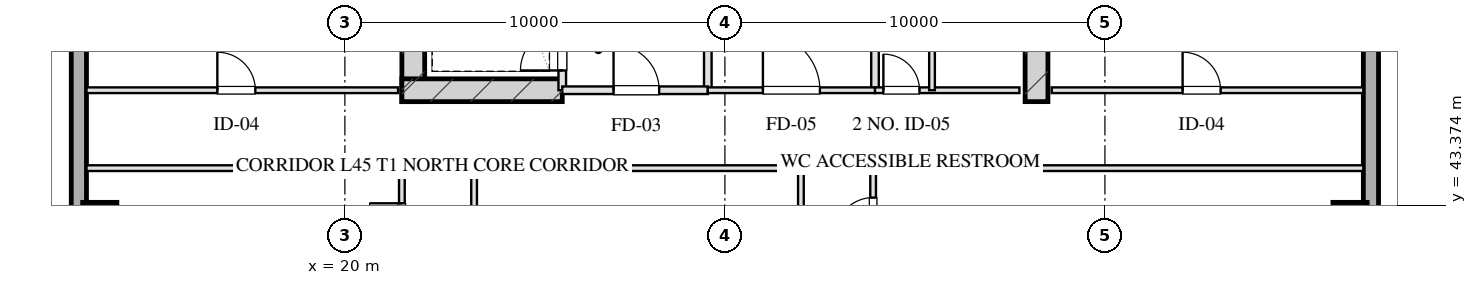
"""IFC4 building model, lengths in metres.
Left out: names, types, materials, properties, quantities, classifications, styles, units other than length and angle.
Written with IfcOpenShell. Run it as: python <this file> out.ifc"""

import sys

from ifc_helpers import new_model, si_unit, direction, frame, frame_2d, origin, origin_2d, place, context, subcontext, project, spatial, rectangle, hollow_rectangle, extrude, element, fill, save


model = new_model("IFC4")
c1 = context("Model", 3, precision=1e-05, world=origin(), true_north=direction((0.0, 1.0)))
c2 = subcontext(c1, "Body", "Model", "MODEL_VIEW")
j1 = project(units=[si_unit("LENGTHUNIT", "METRE"), si_unit("PLANEANGLEUNIT", "RADIAN")], contexts=[c1])
p1 = place(None, origin())
s1 = spatial("IfcSite", under=j1, at=p1, CompositionType="ELEMENT")
p2 = place(p1, origin())
s2 = spatial("IfcBuilding", under=s1, at=p2, CompositionType="ELEMENT")
p3 = place(p2, frame((0.0, 0.0, 170.2)))
s3 = spatial("IfcBuildingStorey", under=s2, at=p3, CompositionType="ELEMENT", Elevation=170.2)
for number, where, z_axis, x_axis in (
    (1, (21.8, 46.1, 0.0), (0.0, 0.0, 1.0), (0.0, 1.0, 0.0)),
    (2, (38.2, 46.1, 0.0), (0.0, 0.0, 1.0), (0.0, 1.0, 0.0)),
):
    element("IfcWall", number, at=place(p3, frame(where, z_axis=z_axis, x_axis=x_axis)), inside=s3, PredefinedType="SHEAR", context=c2, shape_type="SweptSolid", body=[
        extrude(rectangle(XDim=9.48, YDim=0.6, at=frame_2d((4.74, 0.0))), origin(), (0.0, 0.0, 1.0), 3.45),
    ])
p4 = place(p3, frame((21.5, 46.4, 0.0), z_axis=(0.0, 0.0, 1.0), x_axis=(1.0, 0.0, 0.0)))
e3 = element("IfcWall", 3, at=p4, inside=s3, PredefinedType="SHEAR", context=c2, shape_type="SweptSolid", body=[
    extrude(rectangle(XDim=4.22, YDim=0.6, at=frame_2d((2.11, 0.0))), origin(), (0.0, 0.0, 1.0), 3.45),
])
for number, where, z_axis, x_axis in (
    (4, (13.55, 43.0, 0.0), (0.0, 0.0, 1.0), (1.0, 0.0, 0.0)),
    (5, (46.45, 43.0, 0.0), (0.0, 0.0, 1.0), (1.0, 0.0, 0.0)),
):
    element("IfcColumn", number, at=place(p3, frame(where, z_axis=z_axis, x_axis=x_axis)), inside=s3, PredefinedType="COLUMN", context=c2, shape_type="SweptSolid", body=[
        extrude(hollow_rectangle(XDim=0.9, YDim=0.9, WallThickness=0.032, at=origin_2d()), origin(), (0.0, 0.0, 1.0), 3.451),
    ])
p5 = place(p3, frame((13.0, 10.8, 0.0), z_axis=(0.0, 0.0, 1.0), x_axis=(0.0, 1.0, 0.0)))
e6 = element("IfcWall", 6, at=p5, inside=s3, PredefinedType="SOLIDWALL", context=c2, shape_type="SweptSolid", body=[
    extrude(rectangle(XDim=46.4, YDim=0.4, at=frame_2d((23.2, 0.0))), origin(), (0.0, 0.0, 1.0), 2.61),
])
p6 = place(p3, frame((47.0, 57.2, 0.0), z_axis=(0.0, 0.0, 1.0), x_axis=(0.0, -1.0, 0.0)))
e7 = element("IfcWall", 7, at=p6, inside=s3, PredefinedType="SOLIDWALL", context=c2, shape_type="SweptSolid", body=[
    extrude(rectangle(XDim=46.4, YDim=0.4, at=frame_2d((23.2, 0.0))), origin(), (0.0, 0.0, 1.0), 2.61),
])
p7 = place(p6, frame((28.475, 0.0, 0.75)))
e8 = element("IfcOpeningElement", 8, at=p7, cuts=e7, PredefinedType="OPENING", context=c2, shape_type="SweptSolid", body=[
    extrude(rectangle(XDim=2.25, YDim=1.46, at=frame_2d((1.125, 0.73))), frame((0.0, 0.21, 0.0), z_axis=(0.0, -1.0, 0.0), x_axis=(1.0, 0.0, 0.0)), (0.0, 0.0, 1.0), 0.42),
])
p8 = place(p6, frame((24.675, 0.0, 0.75)))
e9 = element("IfcOpeningElement", 9, at=p8, cuts=e7, PredefinedType="OPENING", context=c2, shape_type="SweptSolid", body=[
    extrude(rectangle(XDim=2.25, YDim=1.46, at=frame_2d((1.125, 0.73))), frame((0.0, 0.21, 0.0), z_axis=(0.0, -1.0, 0.0), x_axis=(1.0, 0.0, 0.0)), (0.0, 0.0, 1.0), 0.42),
])
p9 = place(p3, frame((25.72, 46.4, 0.0), z_axis=(0.0, 0.0, 1.0), x_axis=(0.0, 1.0, 0.0)))
e10 = element("IfcWall", 10, at=p9, inside=s3, PredefinedType="PARTITIONING", context=c2, shape_type="SweptSolid", body=[
    extrude(rectangle(XDim=1.9, YDim=0.2, at=frame_2d((0.95, 0.0))), origin(), (0.0, 0.0, 1.0), 3.175),
])
p10 = place(p9, frame((0.52, 0.0, 0.0)))
e11 = element("IfcOpeningElement", 11, at=p10, cuts=e10, PredefinedType="OPENING", context=c2, shape_type="SweptSolid", body=[
    extrude(rectangle(XDim=1.1, YDim=2.05, at=frame_2d((0.55, 1.025))), frame((0.0, 0.11, 0.0), z_axis=(0.0, -1.0, 0.0), x_axis=(1.0, 0.0, 0.0)), (0.0, 0.0, 1.0), 0.22),
])
p11 = place(p3, frame((29.55, 46.4, 0.0), z_axis=(0.0, 0.0, 1.0), x_axis=(0.0, 1.0, 0.0)))
e12 = element("IfcWall", 12, at=p11, inside=s3, PredefinedType="PARTITIONING", context=c2, shape_type="SweptSolid", body=[
    extrude(rectangle(XDim=8.43, YDim=0.2, at=frame_2d((4.215, 0.0))), origin(), (0.0, 0.0, 1.0), 3.175),
])
p12 = place(p3, frame((25.72, 46.4, 0.0), z_axis=(0.0, 0.0, 1.0), x_axis=(1.0, 0.0, 0.0)))
e13 = element("IfcWall", 13, at=p12, inside=s3, PredefinedType="PARTITIONING", context=c2, shape_type="SweptSolid", body=[
    extrude(rectangle(XDim=3.83, YDim=0.2, at=frame_2d((1.915, 0.0))), origin(), (0.0, 0.0, 1.0), 3.175),
])
p13 = place(p12, frame((1.35, 0.0, 0.0)))
e14 = element("IfcOpeningElement", 14, at=p13, cuts=e13, PredefinedType="OPENING", context=c2, shape_type="SweptSolid", body=[
    extrude(rectangle(XDim=1.2, YDim=2.05, at=frame_2d((0.6, 1.025))), frame((0.0, 0.11, 0.0), z_axis=(0.0, -1.0, 0.0), x_axis=(1.0, 0.0, 0.0)), (0.0, 0.0, 1.0), 0.22),
])
p14 = place(p3, frame((33.95, 46.4, 0.0), z_axis=(0.0, 0.0, 1.0), x_axis=(0.0, 1.0, 0.0)))
e15 = element("IfcWall", 15, at=p14, inside=s3, PredefinedType="PARTITIONING", context=c2, shape_type="SweptSolid", body=[
    extrude(rectangle(XDim=8.43, YDim=0.2, at=frame_2d((4.215, 0.0))), origin(), (0.0, 0.0, 1.0), 3.175),
])
p15 = place(p3, frame((29.55, 46.4, 0.0), z_axis=(0.0, 0.0, 1.0), x_axis=(1.0, 0.0, 0.0)))
e16 = element("IfcWall", 16, at=p15, inside=s3, PredefinedType="PARTITIONING", context=c2, shape_type="SweptSolid", body=[
    extrude(rectangle(XDim=4.4, YDim=0.15, at=frame_2d((2.2, 0.0))), origin(), (0.0, 0.0, 1.0), 3.175),
])
p16 = place(p15, frame((1.45, 0.0, 0.0)))
e17 = element("IfcOpeningElement", 17, at=p16, cuts=e16, PredefinedType="OPENING", context=c2, shape_type="SweptSolid", body=[
    extrude(rectangle(XDim=1.5, YDim=2.05, at=frame_2d((0.75, 1.025))), frame((0.0, 0.085, 0.0), z_axis=(0.0, -1.0, 0.0), x_axis=(1.0, 0.0, 0.0)), (0.0, 0.0, 1.0), 0.17),
])
p17 = place(p3, frame((33.95, 46.4, 0.0), z_axis=(0.0, 0.0, 1.0), x_axis=(1.0, 0.0, 0.0)))
e18 = element("IfcWall", 18, at=p17, inside=s3, PredefinedType="PARTITIONING", context=c2, shape_type="SweptSolid", body=[
    extrude(rectangle(XDim=3.8, YDim=0.15, at=frame_2d((1.9, 0.0))), origin(), (0.0, 0.0, 1.0), 3.175),
])
p18 = place(p17, frame((0.22, 0.0, 0.0)))
e19 = element("IfcOpeningElement", 19, at=p18, cuts=e18, PredefinedType="OPENING", context=c2, shape_type="SweptSolid", body=[
    extrude(rectangle(XDim=0.95, YDim=2.05, at=frame_2d((0.475, 1.025))), frame((0.0, 0.085, 0.0), z_axis=(0.0, -1.0, 0.0), x_axis=(1.0, 0.0, 0.0)), (0.0, 0.0, 1.0), 0.17),
])
p19 = place(p3, frame((35.45, 46.4, 0.0), z_axis=(0.0, 0.0, 1.0), x_axis=(0.0, 1.0, 0.0)))
e20 = element("IfcWall", 20, at=p19, inside=s3, PredefinedType="PARTITIONING", context=c2, shape_type="SweptSolid", body=[
    extrude(rectangle(XDim=8.43, YDim=0.15, at=frame_2d((4.215, 0.0))), origin(), (0.0, 0.0, 1.0), 2.815),
])
p20 = place(p19, frame((2.55, 0.0, 0.0)))
e21 = element("IfcOpeningElement", 21, at=p20, cuts=e20, PredefinedType="OPENING", context=c2, shape_type="SweptSolid", body=[
    extrude(rectangle(XDim=0.95, YDim=2.05, at=frame_2d((0.475, 1.025))), frame((0.0, 0.085, 0.0), z_axis=(0.0, -1.0, 0.0), x_axis=(1.0, 0.0, 0.0)), (0.0, 0.0, 1.0), 0.17),
])
p21 = place(p19, frame((5.8, 0.0, 0.0)))
e22 = element("IfcOpeningElement", 22, at=p21, cuts=e20, PredefinedType="OPENING", context=c2, shape_type="SweptSolid", body=[
    extrude(rectangle(XDim=0.9, YDim=2.05, at=frame_2d((0.45, 1.025))), frame((0.0, 0.085, 0.0), z_axis=(0.0, -1.0, 0.0), x_axis=(1.0, 0.0, 0.0)), (0.0, 0.0, 1.0), 0.17),
])
p22 = place(p3, frame((13.2, 46.4, 0.0), z_axis=(0.0, 0.0, 1.0), x_axis=(1.0, 0.0, 0.0)))
e23 = element("IfcWall", 23, at=p22, inside=s3, PredefinedType="PARTITIONING", context=c2, shape_type="SweptSolid", body=[
    extrude(rectangle(XDim=8.2, YDim=0.15, at=frame_2d((4.1, 0.0))), origin(), (0.0, 0.0, 1.0), 3.175),
])
p23 = place(p22, frame((3.444, 0.0, 0.0)))
e24 = element("IfcOpeningElement", 24, at=p23, cuts=e23, PredefinedType="OPENING", context=c2, shape_type="SweptSolid", body=[
    extrude(rectangle(XDim=1.0, YDim=2.05, at=frame_2d((0.5, 1.025))), frame((0.0, 0.085, 0.0), z_axis=(0.0, -1.0, 0.0), x_axis=(1.0, 0.0, 0.0)), (0.0, 0.0, 1.0), 0.17),
])
p24 = place(p3, frame((38.6, 46.4, 0.0), z_axis=(0.0, 0.0, 1.0), x_axis=(1.0, 0.0, 0.0)))
e25 = element("IfcWall", 25, at=p24, inside=s3, PredefinedType="PARTITIONING", context=c2, shape_type="SweptSolid", body=[
    extrude(rectangle(XDim=8.2, YDim=0.15, at=frame_2d((4.1, 0.0))), origin(), (0.0, 0.0, 1.0), 3.175),
])
p25 = place(p24, frame((3.444, 0.0, 0.0)))
e26 = element("IfcOpeningElement", 26, at=p25, cuts=e25, PredefinedType="OPENING", context=c2, shape_type="SweptSolid", body=[
    extrude(rectangle(XDim=1.0, YDim=2.05, at=frame_2d((0.5, 1.025))), frame((0.0, 0.085, 0.0), z_axis=(0.0, -1.0, 0.0), x_axis=(1.0, 0.0, 0.0)), (0.0, 0.0, 1.0), 0.17),
])
p26 = place(p3, frame((13.2, 44.35, 0.0), z_axis=(0.0, 0.0, 1.0), x_axis=(1.0, 0.0, 0.0)))
e27 = element("IfcWall", 27, at=p26, inside=s3, PredefinedType="PARTITIONING", context=c2, shape_type="SweptSolid", body=[
    extrude(rectangle(XDim=8.3, YDim=0.15, at=frame_2d((4.15, 0.0))), origin(), (0.0, 0.0, 1.0), 3.175),
])
p27 = place(p3, frame((23.4, 44.35, 0.0), z_axis=(0.0, 0.0, 1.0), x_axis=(1.0, 0.0, 0.0)))
e28 = element("IfcWall", 28, at=p27, inside=s3, PredefinedType="PARTITIONING", context=c2, shape_type="SweptSolid", body=[
    extrude(rectangle(XDim=8.6, YDim=0.15, at=frame_2d((4.3, 0.0))), origin(), (0.0, 0.0, 1.0), 3.175),
])
p28 = place(p3, frame((33.9, 44.35, 0.0), z_axis=(0.0, 0.0, 1.0), x_axis=(1.0, 0.0, 0.0)))
e29 = element("IfcWall", 29, at=p28, inside=s3, PredefinedType="PARTITIONING", context=c2, shape_type="SweptSolid", body=[
    extrude(rectangle(XDim=12.9, YDim=0.15, at=frame_2d((6.45, 0.0))), origin(), (0.0, 0.0, 1.0), 3.175),
])
p29 = place(p3, frame((21.5, 23.65, 0.0), z_axis=(0.0, 0.0, 1.0), x_axis=(0.0, 1.0, 0.0)))
e30 = element("IfcWall", 30, at=p29, inside=s3, PredefinedType="PARTITIONING", context=c2, shape_type="SweptSolid", body=[
    extrude(rectangle(XDim=20.7, YDim=0.15, at=frame_2d((10.35, 0.0))), origin(), (0.0, 0.0, 1.0), 3.175),
])
p30 = place(p29, frame((0.775, 0.0, 0.0)))
e31 = element("IfcOpeningElement", 31, at=p30, cuts=e30, PredefinedType="OPENING", context=c2, shape_type="SweptSolid", body=[
    extrude(rectangle(XDim=1.0, YDim=2.05, at=frame_2d((0.5, 1.025))), frame((0.0, 0.085, 0.0), z_axis=(0.0, -1.0, 0.0), x_axis=(1.0, 0.0, 0.0)), (0.0, 0.0, 1.0), 0.17),
])
p31 = place(p29, frame((3.95, 0.0, 0.0)))
e32 = element("IfcOpeningElement", 32, at=p31, cuts=e30, PredefinedType="OPENING", context=c2, shape_type="SweptSolid", body=[
    extrude(rectangle(XDim=1.05, YDim=2.05, at=frame_2d((0.525, 1.025))), frame((0.0, 0.085, 0.0), z_axis=(0.0, -1.0, 0.0), x_axis=(1.0, 0.0, 0.0)), (0.0, 0.0, 1.0), 0.17),
])
p32 = place(p29, frame((7.51, 0.0, 0.0)))
e33 = element("IfcOpeningElement", 33, at=p32, cuts=e30, PredefinedType="OPENING", context=c2, shape_type="SweptSolid", body=[
    extrude(rectangle(XDim=1.0, YDim=2.05, at=frame_2d((0.5, 1.025))), frame((0.0, 0.085, 0.0), z_axis=(0.0, -1.0, 0.0), x_axis=(1.0, 0.0, 0.0)), (0.0, 0.0, 1.0), 0.17),
])
p33 = place(p29, frame((11.51, 0.0, 0.0)))
e34 = element("IfcOpeningElement", 34, at=p33, cuts=e30, PredefinedType="OPENING", context=c2, shape_type="SweptSolid", body=[
    extrude(rectangle(XDim=1.0, YDim=2.05, at=frame_2d((0.5, 1.025))), frame((0.0, 0.085, 0.0), z_axis=(0.0, -1.0, 0.0), x_axis=(1.0, 0.0, 0.0)), (0.0, 0.0, 1.0), 0.17),
])
p34 = place(p29, frame((15.75, 0.0, 0.0)))
e35 = element("IfcOpeningElement", 35, at=p34, cuts=e30, PredefinedType="OPENING", context=c2, shape_type="SweptSolid", body=[
    extrude(rectangle(XDim=1.0, YDim=2.05, at=frame_2d((0.5, 1.025))), frame((0.0, 0.085, 0.0), z_axis=(0.0, -1.0, 0.0), x_axis=(1.0, 0.0, 0.0)), (0.0, 0.0, 1.0), 0.17),
])
p35 = place(p29, frame((18.925, 0.0, 0.0)))
e36 = element("IfcOpeningElement", 36, at=p35, cuts=e30, PredefinedType="OPENING", context=c2, shape_type="SweptSolid", body=[
    extrude(rectangle(XDim=0.85, YDim=2.05, at=frame_2d((0.425, 1.025))), frame((0.0, 0.085, 0.0), z_axis=(0.0, -1.0, 0.0), x_axis=(1.0, 0.0, 0.0)), (0.0, 0.0, 1.0), 0.17),
])
p36 = place(p3, frame((23.4, 23.65, 0.0), z_axis=(0.0, 0.0, 1.0), x_axis=(0.0, 1.0, 0.0)))
e37 = element("IfcWall", 37, at=p36, inside=s3, PredefinedType="PARTITIONING", context=c2, shape_type="SweptSolid", body=[
    extrude(rectangle(XDim=20.7, YDim=0.15, at=frame_2d((10.35, 0.0))), origin(), (0.0, 0.0, 1.0), 3.175),
])
p37 = place(p36, frame((4.117, 0.0, 0.0)))
e38 = element("IfcOpeningElement", 38, at=p37, cuts=e37, PredefinedType="OPENING", context=c2, shape_type="SweptSolid", body=[
    extrude(rectangle(XDim=1.1, YDim=2.05, at=frame_2d((0.55, 1.025))), frame((0.0, 0.085, 0.0), z_axis=(0.0, -1.0, 0.0), x_axis=(1.0, 0.0, 0.0)), (0.0, 0.0, 1.0), 0.17),
])
p38 = place(p36, frame((14.347, 0.0, 0.0)))
e39 = element("IfcOpeningElement", 39, at=p38, cuts=e37, PredefinedType="OPENING", context=c2, shape_type="SweptSolid", body=[
    extrude(rectangle(XDim=1.1, YDim=2.05, at=frame_2d((0.55, 1.025))), frame((0.0, 0.085, 0.0), z_axis=(0.0, -1.0, 0.0), x_axis=(1.0, 0.0, 0.0)), (0.0, 0.0, 1.0), 0.17),
])
p39 = place(p3, frame((32.0, 23.65, 0.0), z_axis=(0.0, 0.0, 1.0), x_axis=(0.0, 1.0, 0.0)))
e40 = element("IfcWall", 40, at=p39, inside=s3, PredefinedType="PARTITIONING", context=c2, shape_type="SweptSolid", body=[
    extrude(rectangle(XDim=20.7, YDim=0.15, at=frame_2d((10.35, 0.0))), origin(), (0.0, 0.0, 1.0), 3.175),
])
p40 = place(p3, frame((33.9, 23.65, 0.0), z_axis=(0.0, 0.0, 1.0), x_axis=(0.0, 1.0, 0.0)))
e41 = element("IfcWall", 41, at=p40, inside=s3, PredefinedType="PARTITIONING", context=c2, shape_type="SweptSolid", body=[
    extrude(rectangle(XDim=20.7, YDim=0.15, at=frame_2d((10.35, 0.0))), origin(), (0.0, 0.0, 1.0), 3.175),
])
p41 = place(p40, frame((2.329, 0.0, 0.0)))
e42 = element("IfcOpeningElement", 42, at=p41, cuts=e41, PredefinedType="OPENING", context=c2, shape_type="SweptSolid", body=[
    extrude(rectangle(XDim=1.05, YDim=2.05, at=frame_2d((0.525, 1.025))), frame((0.0, 0.085, 0.0), z_axis=(0.0, -1.0, 0.0), x_axis=(1.0, 0.0, 0.0)), (0.0, 0.0, 1.0), 0.17),
])
p42 = place(p40, frame((8.104, 0.0, 0.0)))
e43 = element("IfcOpeningElement", 43, at=p42, cuts=e41, PredefinedType="OPENING", context=c2, shape_type="SweptSolid", body=[
    extrude(rectangle(XDim=1.0, YDim=2.05, at=frame_2d((0.5, 1.025))), frame((0.0, 0.085, 0.0), z_axis=(0.0, -1.0, 0.0), x_axis=(1.0, 0.0, 0.0)), (0.0, 0.0, 1.0), 0.17),
])
p43 = place(p40, frame((14.35, 0.0, 0.0)))
e44 = element("IfcOpeningElement", 44, at=p43, cuts=e41, PredefinedType="OPENING", context=c2, shape_type="SweptSolid", body=[
    extrude(rectangle(XDim=1.0, YDim=2.05, at=frame_2d((0.5, 1.025))), frame((0.0, 0.085, 0.0), z_axis=(0.0, -1.0, 0.0), x_axis=(1.0, 0.0, 0.0)), (0.0, 0.0, 1.0), 0.17),
])
p44 = place(p40, frame((18.925, 0.0, 0.0)))
e45 = element("IfcOpeningElement", 45, at=p44, cuts=e41, PredefinedType="OPENING", context=c2, shape_type="SweptSolid", body=[
    extrude(rectangle(XDim=1.0, YDim=2.05, at=frame_2d((0.5, 1.025))), frame((0.0, 0.085, 0.0), z_axis=(0.0, -1.0, 0.0), x_axis=(1.0, 0.0, 0.0)), (0.0, 0.0, 1.0), 0.17),
])
p45 = place(p10, origin())
e46 = element("IfcDoor", 46, at=p45, inside=s3, OperationType="SINGLE_SWING_LEFT", PredefinedType="DOOR", context=c2, shape_type="SweptSolid", body=[
    extrude(rectangle(XDim=1.1, YDim=2.05, at=frame_2d((0.55, 1.025))), frame((0.0, 0.025, 0.0), z_axis=(0.0, -1.0, 0.0), x_axis=(1.0, 0.0, 0.0)), (0.0, 0.0, 1.0), 0.05),
])
fill(e11, e46)
p46 = place(p13, origin())
e47 = element("IfcDoor", 47, at=p46, inside=s3, OperationType="SINGLE_SWING_LEFT", PredefinedType="DOOR", context=c2, shape_type="SweptSolid", body=[
    extrude(rectangle(XDim=1.2, YDim=2.05, at=frame_2d((0.6, 1.025))), frame((0.0, 0.025, 0.0), z_axis=(0.0, -1.0, 0.0), x_axis=(1.0, 0.0, 0.0)), (0.0, 0.0, 1.0), 0.05),
])
fill(e14, e47)
p47 = place(p16, origin())
e48 = element("IfcDoor", 48, at=p47, inside=s3, OperationType="SINGLE_SWING_LEFT", PredefinedType="DOOR", context=c2, shape_type="SweptSolid", body=[
    extrude(rectangle(XDim=1.5, YDim=2.05, at=frame_2d((0.75, 1.025))), frame((0.0, 0.025, 0.0), z_axis=(0.0, -1.0, 0.0), x_axis=(1.0, 0.0, 0.0)), (0.0, 0.0, 1.0), 0.05),
])
fill(e17, e48)
p48 = place(p18, origin())
e49 = element("IfcDoor", 49, at=p48, inside=s3, OperationType="SINGLE_SWING_LEFT", PredefinedType="DOOR", context=c2, shape_type="SweptSolid", body=[
    extrude(rectangle(XDim=0.95, YDim=2.05, at=frame_2d((0.475, 1.025))), frame((0.0, 0.025, 0.0), z_axis=(0.0, -1.0, 0.0), x_axis=(1.0, 0.0, 0.0)), (0.0, 0.0, 1.0), 0.05),
])
fill(e19, e49)
p49 = place(p23, origin())
e50 = element("IfcDoor", 50, at=p49, inside=s3, OperationType="SINGLE_SWING_LEFT", PredefinedType="DOOR", context=c2, shape_type="SweptSolid", body=[
    extrude(rectangle(XDim=1.0, YDim=2.05, at=frame_2d((0.5, 1.025))), frame((0.0, 0.025, 0.0), z_axis=(0.0, -1.0, 0.0), x_axis=(1.0, 0.0, 0.0)), (0.0, 0.0, 1.0), 0.05),
])
fill(e24, e50)
p50 = place(p25, origin())
e51 = element("IfcDoor", 51, at=p50, inside=s3, OperationType="SINGLE_SWING_LEFT", PredefinedType="DOOR", context=c2, shape_type="SweptSolid", body=[
    extrude(rectangle(XDim=1.0, YDim=2.05, at=frame_2d((0.5, 1.025))), frame((0.0, 0.025, 0.0), z_axis=(0.0, -1.0, 0.0), x_axis=(1.0, 0.0, 0.0)), (0.0, 0.0, 1.0), 0.05),
])
fill(e26, e51)
p51 = place(p35, origin())
e52 = element("IfcDoor", 52, at=p51, inside=s3, OperationType="SINGLE_SWING_RIGHT", PredefinedType="DOOR", context=c2, shape_type="SweptSolid", body=[
    extrude(rectangle(XDim=0.85, YDim=2.05, at=frame_2d((0.425, 1.025))), frame((0.0, 0.025, 0.0), z_axis=(0.0, -1.0, 0.0), x_axis=(1.0, 0.0, 0.0)), (0.0, 0.0, 1.0), 0.05),
])
fill(e36, e52)
p52 = place(p44, origin())
e53 = element("IfcDoor", 53, at=p52, inside=s3, OperationType="SINGLE_SWING_LEFT", PredefinedType="DOOR", context=c2, shape_type="SweptSolid", body=[
    extrude(rectangle(XDim=1.0, YDim=2.05, at=frame_2d((0.5, 1.025))), frame((0.0, 0.025, 0.0), z_axis=(0.0, -1.0, 0.0), x_axis=(1.0, 0.0, 0.0)), (0.0, 0.0, 1.0), 0.05),
])
fill(e45, e53)
save(model, sys.argv[1])
